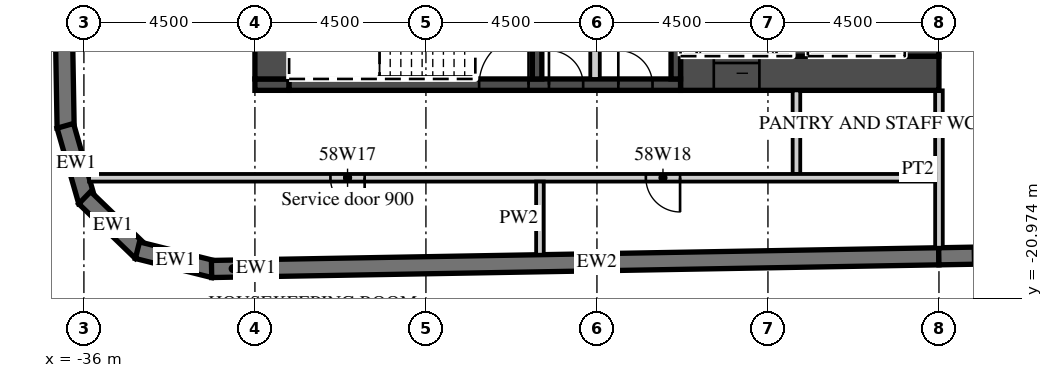
"""IFC4 building model, lengths in metres.
Left out: names, types, materials, properties, quantities, classifications, styles, units other than length and angle.
Written with IfcOpenShell. Run it as: python <this file> out.ifc"""

import sys

from ifc_helpers import new_model, si_unit, direction, frame, frame_2d, origin, place, context, subcontext, project, spatial, polyline, rectangle, outline, extrude, element, fill, save


model = new_model("IFC4")
c1 = context("Model", 3, precision=1e-05, world=origin(), true_north=direction((0.0, 1.0)))
c2 = subcontext(c1, "Body", "Model", "MODEL_VIEW")
j1 = project(units=[si_unit("LENGTHUNIT", "METRE"), si_unit("PLANEANGLEUNIT", "RADIAN")], contexts=[c1])
p1 = place(None, origin())
s1 = spatial("IfcSite", under=j1, at=p1, CompositionType="ELEMENT")
p2 = place(p1, origin())
s2 = spatial("IfcBuilding", under=s1, at=p2, CompositionType="ELEMENT")
p3 = place(p2, frame((0.0, 0.0, 237.5)))
s3 = spatial("IfcBuildingStorey", under=s2, at=p3, CompositionType="ELEMENT", Elevation=237.5)
p4 = place(p3, frame((-37.057, 16.503, 0.0), z_axis=(0.0, 0.0, 1.0), x_axis=(0.017452279857, -0.999847697366, 0.0)))
e1 = element("IfcWall", 1, at=p4, inside=s3, PredefinedType="SOLIDWALL", context=c2, shape_type="SweptSolid", body=[
    extrude(rectangle(XDim=33.0, YDim=0.45, at=frame_2d((16.5, 0.0))), origin(), (0.0, 0.0, 1.0), 3.02),
])
p5 = place(p3, frame((-36.49, -16.434, 0.0), z_axis=(0.0, 0.0, 1.0), x_axis=(0.275577603096, -0.961278827745, 0.0)))
e2 = element("IfcWall", 2, at=p5, inside=s3, PredefinedType="SOLIDWALL", context=c2, shape_type="SweptSolid", body=[
    extrude(outline(polyline([(0.0, -0.225), (2.071, -0.225), (1.95, 0.225), (0.121, 0.225), (0.0, -0.225)])), origin(), (0.0, 0.0, 1.0), 3.02),
])
p6 = place(p3, frame((-35.979, -18.324, 0.0), z_axis=(0.0, 0.0, 1.0), x_axis=(0.719320193998, -0.694678672846, 0.0)))
e3 = element("IfcWall", 3, at=p6, inside=s3, PredefinedType="SOLIDWALL", context=c2, shape_type="SweptSolid", body=[
    extrude(outline(polyline([(0.0, -0.225), (2.071, -0.225), (1.95, 0.225), (0.121, 0.225), (0.0, -0.225)])), origin(), (0.0, 0.0, 1.0), 3.02),
])
p7 = place(p3, frame((-34.591, -19.706, 0.0), z_axis=(0.0, 0.0, 1.0), x_axis=(0.970315655375, -0.241841950319, 0.0)))
e4 = element("IfcWall", 4, at=p7, inside=s3, PredefinedType="SOLIDWALL", context=c2, shape_type="SweptSolid", body=[
    extrude(outline(polyline([(0.0, -0.225), (2.071, -0.225), (1.95, 0.225), (0.121, 0.225), (0.0, -0.225)])), origin(), (0.0, 0.0, 1.0), 3.02),
])
p8 = place(p3, frame((-32.641, -20.2, 0.0), z_axis=(0.0, 0.0, 1.0), x_axis=(0.99984870815, 0.017394275206, 0.0)))
e5 = element("IfcWall", 5, at=p8, inside=s3, PredefinedType="SOLIDWALL", context=c2, shape_type="SweptSolid", body=[
    extrude(rectangle(XDim=1.137, YDim=0.45, at=frame_2d((0.568, 0.0))), origin(), (0.0, 0.0, 1.0), 3.02),
])
p9 = place(p3, frame((-31.504, -20.18, 0.0), z_axis=(0.0, 0.0, 1.0), x_axis=(0.999847677887, 0.017453395744, 0.0)))
e6 = element("IfcWall", 6, at=p9, inside=s3, PredefinedType="SOLIDWALL", context=c2, shape_type="SweptSolid", body=[
    extrude(rectangle(XDim=18.003, YDim=0.45, at=frame_2d((9.001, 0.0))), origin(), (0.0, 0.0, 1.0), 3.02),
])
p10 = place(p3, frame((-13.504, -19.866, 0.0), z_axis=(0.0, 0.0, 1.0), x_axis=(0.999847672978, 0.017453676992, 0.0)))
e7 = element("IfcWall", 7, at=p10, inside=s3, PredefinedType="SOLIDWALL", context=c2, shape_type="SweptSolid", body=[
    extrude(rectangle(XDim=52.86, YDim=0.45, at=frame_2d((26.43, 0.0))), origin(), (0.0, 0.0, 1.0), 3.02),
])
p11 = place(p10, frame((0.9, 0.0, 0.45)))
e8 = element("IfcOpeningElement", 8, at=p11, cuts=e7, PredefinedType="OPENING", context=c2, shape_type="SweptSolid", body=[
    extrude(rectangle(XDim=2.7, YDim=2.25, at=frame_2d((1.35, 1.125))), frame((0.0, 0.235, 0.0), z_axis=(0.0, -1.0, 0.0), x_axis=(1.0, 0.0, 0.0)), (0.0, 0.0, 1.0), 0.47),
])
p12 = place(p10, frame((5.401, 0.0, 0.45)))
e9 = element("IfcOpeningElement", 9, at=p12, cuts=e7, PredefinedType="OPENING", context=c2, shape_type="SweptSolid", body=[
    extrude(rectangle(XDim=2.7, YDim=2.25, at=frame_2d((1.35, 1.125))), frame((0.0, 0.235, 0.0), z_axis=(0.0, -1.0, 0.0), x_axis=(1.0, 0.0, 0.0)), (0.0, 0.0, 1.0), 0.47),
])
p13 = place(p10, frame((9.902, 0.0, 0.45)))
e10 = element("IfcOpeningElement", 10, at=p13, cuts=e7, PredefinedType="OPENING", context=c2, shape_type="SweptSolid", body=[
    extrude(rectangle(XDim=2.7, YDim=2.25, at=frame_2d((1.35, 1.125))), frame((0.0, 0.235, 0.0), z_axis=(0.0, -1.0, 0.0), x_axis=(1.0, 0.0, 0.0)), (0.0, 0.0, 1.0), 0.47),
])
p14 = place(p10, frame((14.402, 0.0, 0.45)))
e11 = element("IfcOpeningElement", 11, at=p14, cuts=e7, PredefinedType="OPENING", context=c2, shape_type="SweptSolid", body=[
    extrude(rectangle(XDim=2.7, YDim=2.25, at=frame_2d((1.35, 1.125))), frame((0.0, 0.235, 0.0), z_axis=(0.0, -1.0, 0.0), x_axis=(1.0, 0.0, 0.0)), (0.0, 0.0, 1.0), 0.47),
])
p15 = place(p10, frame((18.903, 0.0, 0.45)))
e12 = element("IfcOpeningElement", 12, at=p15, cuts=e7, PredefinedType="OPENING", context=c2, shape_type="SweptSolid", body=[
    extrude(rectangle(XDim=2.7, YDim=2.25, at=frame_2d((1.35, 1.125))), frame((0.0, 0.235, 0.0), z_axis=(0.0, -1.0, 0.0), x_axis=(1.0, 0.0, 0.0)), (0.0, 0.0, 1.0), 0.47),
])
p16 = place(p10, frame((23.404, 0.0, 0.45)))
e13 = element("IfcOpeningElement", 13, at=p16, cuts=e7, PredefinedType="OPENING", context=c2, shape_type="SweptSolid", body=[
    extrude(rectangle(XDim=2.7, YDim=2.25, at=frame_2d((1.35, 1.125))), frame((0.0, 0.235, 0.0), z_axis=(0.0, -1.0, 0.0), x_axis=(1.0, 0.0, 0.0)), (0.0, 0.0, 1.0), 0.47),
])
p17 = place(p10, frame((27.904, 0.0, 0.45)))
e14 = element("IfcOpeningElement", 14, at=p17, cuts=e7, PredefinedType="OPENING", context=c2, shape_type="SweptSolid", body=[
    extrude(rectangle(XDim=2.7, YDim=2.25, at=frame_2d((1.35, 1.125))), frame((0.0, 0.235, 0.0), z_axis=(0.0, -1.0, 0.0), x_axis=(1.0, 0.0, 0.0)), (0.0, 0.0, 1.0), 0.47),
])
p18 = place(p10, frame((32.405, 0.0, 0.45)))
e15 = element("IfcOpeningElement", 15, at=p18, cuts=e7, PredefinedType="OPENING", context=c2, shape_type="SweptSolid", body=[
    extrude(rectangle(XDim=2.7, YDim=2.25, at=frame_2d((1.35, 1.125))), frame((0.0, 0.235, 0.0), z_axis=(0.0, -1.0, 0.0), x_axis=(1.0, 0.0, 0.0)), (0.0, 0.0, 1.0), 0.47),
])
p19 = place(p10, frame((36.906, 0.0, 0.45)))
e16 = element("IfcOpeningElement", 16, at=p19, cuts=e7, PredefinedType="OPENING", context=c2, shape_type="SweptSolid", body=[
    extrude(rectangle(XDim=2.7, YDim=2.25, at=frame_2d((1.35, 1.125))), frame((0.0, 0.235, 0.0), z_axis=(0.0, -1.0, 0.0), x_axis=(1.0, 0.0, 0.0)), (0.0, 0.0, 1.0), 0.47),
])
p20 = place(p10, frame((41.406, 0.0, 0.45)))
e17 = element("IfcOpeningElement", 17, at=p20, cuts=e7, PredefinedType="OPENING", context=c2, shape_type="SweptSolid", body=[
    extrude(rectangle(XDim=2.7, YDim=2.25, at=frame_2d((1.35, 1.125))), frame((0.0, 0.235, 0.0), z_axis=(0.0, -1.0, 0.0), x_axis=(1.0, 0.0, 0.0)), (0.0, 0.0, 1.0), 0.47),
])
p21 = place(p10, frame((45.907, 0.0, 0.45)))
e18 = element("IfcOpeningElement", 18, at=p21, cuts=e7, PredefinedType="OPENING", context=c2, shape_type="SweptSolid", body=[
    extrude(rectangle(XDim=2.7, YDim=2.25, at=frame_2d((1.35, 1.125))), frame((0.0, 0.235, 0.0), z_axis=(0.0, -1.0, 0.0), x_axis=(1.0, 0.0, 0.0)), (0.0, 0.0, 1.0), 0.47),
])
p22 = place(p3, frame((-13.5, -19.641, 0.0), z_axis=(0.0, 0.0, 1.0), x_axis=(0.0, 1.0, 0.0)))
e19 = element("IfcWall", 19, at=p22, inside=s3, PredefinedType="PARTITIONING", context=c2, shape_type="SweptSolid", body=[
    extrude(rectangle(XDim=4.141, YDim=0.2, at=frame_2d((2.071, 0.0))), origin(), (0.0, 0.0, 1.0), 3.02),
])
p23 = place(p3, frame((-20.3, -15.05, 0.0), z_axis=(0.0, 0.0, 1.0), x_axis=(1.0, 0.0, 0.0)))
e20 = element("IfcWall", 20, at=p23, inside=s3, PredefinedType="SHEAR", context=c2, shape_type="SweptSolid", body=[
    extrude(rectangle(XDim=6.8, YDim=0.9, at=frame_2d((3.4, 0.0))), origin(), (0.0, 0.0, 1.0), 3.02),
])
p24 = place(p23, frame((0.875, 0.0, 0.0)))
e21 = element("IfcOpeningElement", 21, at=p24, cuts=e20, PredefinedType="OPENING", context=c2, shape_type="SweptSolid", body=[
    extrude(rectangle(XDim=1.2, YDim=2.1, at=frame_2d((0.6, 1.05))), frame((0.0, 0.46, 0.0), z_axis=(0.0, -1.0, 0.0), x_axis=(1.0, 0.0, 0.0)), (0.0, 0.0, 1.0), 0.92),
])
p25 = place(p3, frame((-31.5, -15.35, 0.0), z_axis=(0.0, 0.0, 1.0), x_axis=(1.0, 0.0, 0.0)))
e22 = element("IfcWall", 22, at=p25, inside=s3, PredefinedType="SHEAR", context=c2, shape_type="SweptSolid", body=[
    extrude(rectangle(XDim=0.9, YDim=0.3, at=frame_2d((0.45, 0.0))), origin(), (0.0, 0.0, 1.0), 3.02),
])
p26 = place(p3, frame((-30.6, -15.35, 0.0), z_axis=(0.0, 0.0, 1.0), x_axis=(1.0, 0.0, 0.0)))
e23 = element("IfcWall", 23, at=p26, inside=s3, PredefinedType="SHEAR", context=c2, shape_type="SweptSolid", body=[
    extrude(rectangle(XDim=10.3, YDim=0.3, at=frame_2d((5.15, 0.0))), origin(), (0.0, 0.0, 1.0), 3.02),
])
p27 = place(p26, frame((5.0, 0.0, 0.0)))
e24 = element("IfcOpeningElement", 24, at=p27, cuts=e23, PredefinedType="OPENING", context=c2, shape_type="SweptSolid", body=[
    extrude(rectangle(XDim=1.3, YDim=2.1, at=frame_2d((0.65, 1.05))), frame((0.0, 0.16, 0.0), z_axis=(0.0, -1.0, 0.0), x_axis=(1.0, 0.0, 0.0)), (0.0, 0.0, 1.0), 0.32),
])
p28 = place(p26, frame((6.837, 0.0, 0.0)))
e25 = element("IfcOpeningElement", 25, at=p28, cuts=e23, PredefinedType="OPENING", context=c2, shape_type="SweptSolid", body=[
    extrude(rectangle(XDim=0.9, YDim=2.1, at=frame_2d((0.45, 1.05))), frame((0.0, 0.16, 0.0), z_axis=(0.0, -1.0, 0.0), x_axis=(1.0, 0.0, 0.0)), (0.0, 0.0, 1.0), 0.32),
])
p29 = place(p26, frame((8.663, 0.0, 0.0)))
e26 = element("IfcOpeningElement", 26, at=p29, cuts=e23, PredefinedType="OPENING", context=c2, shape_type="SweptSolid", body=[
    extrude(rectangle(XDim=0.9, YDim=2.1, at=frame_2d((0.45, 1.05))), frame((0.0, 0.16, 0.0), z_axis=(0.0, -1.0, 0.0), x_axis=(1.0, 0.0, 0.0)), (0.0, 0.0, 1.0), 0.32),
])
p30 = place(p3, frame((-31.05, -15.2, 0.0), z_axis=(0.0, 0.0, 1.0), x_axis=(0.0, 1.0, 0.0)))
e27 = element("IfcWall", 27, at=p30, inside=s3, PredefinedType="SHEAR", context=c2, shape_type="SweptSolid", body=[
    extrude(rectangle(XDim=12.8, YDim=0.9, at=frame_2d((6.4, 0.0))), origin(), (0.0, 0.0, 1.0), 3.02),
])
p31 = place(p30, frame((11.5, 0.0, 0.0)))
e28 = element("IfcOpeningElement", 28, at=p31, cuts=e27, PredefinedType="OPENING", context=c2, shape_type="SweptSolid", body=[
    extrude(rectangle(XDim=1.1, YDim=2.1, at=frame_2d((0.55, 1.05))), frame((0.0, 0.46, 0.0), z_axis=(0.0, -1.0, 0.0), x_axis=(1.0, 0.0, 0.0)), (0.0, 0.0, 1.0), 0.92),
])
p32 = place(p3, frame((-13.95, -14.6, 0.0), z_axis=(0.0, 0.0, 1.0), x_axis=(0.0, 1.0, 0.0)))
e29 = element("IfcWall", 29, at=p32, inside=s3, PredefinedType="SHEAR", context=c2, shape_type="SweptSolid", body=[
    extrude(rectangle(XDim=12.2, YDim=0.9, at=frame_2d((6.1, 0.0))), origin(), (0.0, 0.0, 1.0), 3.02),
])
p33 = place(p3, frame((-17.15, -14.6, 0.0), z_axis=(0.0, 0.0, 1.0), x_axis=(0.0, 1.0, 0.0)))
e30 = element("IfcWall", 30, at=p33, inside=s3, PredefinedType="SHEAR", context=c2, shape_type="SweptSolid", body=[
    extrude(rectangle(XDim=5.8, YDim=0.4, at=frame_2d((2.9, 0.0))), origin(), (0.0, 0.0, 1.0), 3.02),
])
for number, where, z_axis, x_axis in (
    (31, (-20.425, -15.2, 0.0), (0.0, 0.0, 1.0), (0.0, 1.0, 0.0)),
    (32, (-24.075, -15.2, 0.0), (0.0, 0.0, 1.0), (0.0, 1.0, 0.0)),
):
    element("IfcWall", number, at=place(p3, frame(where, z_axis=z_axis, x_axis=x_axis)), inside=s3, PredefinedType="SHEAR", context=c2, shape_type="SweptSolid", body=[
        extrude(rectangle(XDim=3.25, YDim=0.25, at=frame_2d((1.625, 0.0))), origin(), (0.0, 0.0, 1.0), 3.02),
    ])
p34 = place(p3, frame((-22.55, -15.2, 0.0), z_axis=(0.0, 0.0, 1.0), x_axis=(0.0, 1.0, 0.0)))
e33 = element("IfcWall", 33, at=p34, inside=s3, PredefinedType="PARTITIONING", context=c2, shape_type="SweptSolid", body=[
    extrude(rectangle(XDim=3.25, YDim=0.25, at=frame_2d((1.625, 0.0))), origin(), (0.0, 0.0, 1.0), 3.02),
])
p35 = place(p3, frame((-17.25, -17.7, 0.0), z_axis=(0.0, 0.0, 1.0), x_axis=(0.0, 1.0, 0.0)))
e34 = element("IfcWall", 34, at=p35, inside=s3, PredefinedType="PARTITIONING", context=c2, shape_type="SweptSolid", body=[
    extrude(rectangle(XDim=2.2, YDim=0.2, at=frame_2d((1.1, 0.0))), origin(), (0.0, 0.0, 1.0), 3.02),
])
p36 = place(p3, frame((-35.864, -17.8, 0.0), z_axis=(0.0, 0.0, 1.0), x_axis=(1.0, 0.0, 0.0)))
e35 = element("IfcWall", 35, at=p36, inside=s3, PredefinedType="PARTITIONING", context=c2, shape_type="SweptSolid", body=[
    extrude(rectangle(XDim=22.264, YDim=0.2, at=frame_2d((11.132, 0.0))), origin(), (0.0, 0.0, 1.0), 3.02),
])
p37 = place(p36, frame((6.351, 0.0, 0.0)))
e36 = element("IfcOpeningElement", 36, at=p37, cuts=e35, PredefinedType="OPENING", context=c2, shape_type="SweptSolid", body=[
    extrude(rectangle(XDim=0.9, YDim=2.1, at=frame_2d((0.45, 1.05))), frame((0.0, 0.11, 0.0), z_axis=(0.0, -1.0, 0.0), x_axis=(1.0, 0.0, 0.0)), (0.0, 0.0, 1.0), 0.22),
])
p38 = place(p36, frame((14.651, 0.0, 0.0)))
e37 = element("IfcOpeningElement", 37, at=p38, cuts=e35, PredefinedType="OPENING", context=c2, shape_type="SweptSolid", body=[
    extrude(rectangle(XDim=0.9, YDim=2.1, at=frame_2d((0.45, 1.05))), frame((0.0, 0.11, 0.0), z_axis=(0.0, -1.0, 0.0), x_axis=(1.0, 0.0, 0.0)), (0.0, 0.0, 1.0), 0.22),
])
p39 = place(p3, frame((-24.0, -19.824, 0.0), z_axis=(0.0, 0.0, 1.0), x_axis=(0.0, 1.0, 0.0)))
e38 = element("IfcWall", 38, at=p39, inside=s3, PredefinedType="PARTITIONING", context=c2, shape_type="SweptSolid", body=[
    extrude(rectangle(XDim=1.925, YDim=0.2, at=frame_2d((0.962, 0.0))), origin(), (0.0, 0.0, 1.0), 3.02),
])
p40 = place(p11, origin())
e39 = element("IfcWindow", 39, at=p40, inside=s3, PartitioningType="SINGLE_PANEL", PredefinedType="WINDOW", context=c2, shape_type="SweptSolid", body=[
    extrude(rectangle(XDim=2.7, YDim=2.25, at=frame_2d((1.35, 1.125))), frame((0.0, 0.09, 0.0), z_axis=(0.0, -1.0, 0.0), x_axis=(1.0, 0.0, 0.0)), (0.0, 0.0, 1.0), 0.06),
])
fill(e8, e39)
p41 = place(p24, origin())
e40 = element("IfcDoor", 40, at=p41, inside=s3, OperationType="SLIDING_TO_LEFT", PredefinedType="DOOR", context=c2, shape_type="SweptSolid", body=[
    extrude(rectangle(XDim=1.2, YDim=2.1, at=frame_2d((0.6, 1.05))), frame((0.0, 0.025, 0.0), z_axis=(0.0, -1.0, 0.0), x_axis=(1.0, 0.0, 0.0)), (0.0, 0.0, 1.0), 0.05),
])
fill(e21, e40)
p42 = place(p27, origin())
e41 = element("IfcDoor", 41, at=p42, inside=s3, OperationType="SINGLE_SWING_RIGHT", PredefinedType="DOOR", context=c2, shape_type="SweptSolid", body=[
    extrude(rectangle(XDim=1.3, YDim=2.1, at=frame_2d((0.65, 1.05))), frame((0.0, 0.025, 0.0), z_axis=(0.0, -1.0, 0.0), x_axis=(1.0, 0.0, 0.0)), (0.0, 0.0, 1.0), 0.05),
])
fill(e24, e41)
p43 = place(p28, origin())
e42 = element("IfcDoor", 42, at=p43, inside=s3, OperationType="SINGLE_SWING_LEFT", PredefinedType="DOOR", context=c2, shape_type="SweptSolid", body=[
    extrude(rectangle(XDim=0.9, YDim=2.1, at=frame_2d((0.45, 1.05))), frame((0.0, 0.025, 0.0), z_axis=(0.0, -1.0, 0.0), x_axis=(1.0, 0.0, 0.0)), (0.0, 0.0, 1.0), 0.05),
])
fill(e25, e42)
p44 = place(p29, origin())
e43 = element("IfcDoor", 43, at=p44, inside=s3, OperationType="SINGLE_SWING_LEFT", PredefinedType="DOOR", context=c2, shape_type="SweptSolid", body=[
    extrude(rectangle(XDim=0.9, YDim=2.1, at=frame_2d((0.45, 1.05))), frame((0.0, 0.025, 0.0), z_axis=(0.0, -1.0, 0.0), x_axis=(1.0, 0.0, 0.0)), (0.0, 0.0, 1.0), 0.05),
])
fill(e26, e43)
p45 = place(p37, origin())
e44 = element("IfcDoor", 44, at=p45, inside=s3, OperationType="SINGLE_SWING_RIGHT", PredefinedType="DOOR", context=c2, shape_type="SweptSolid", body=[
    extrude(rectangle(XDim=0.9, YDim=2.1, at=frame_2d((0.45, 1.05))), frame((0.0, 0.025, 0.0), z_axis=(0.0, -1.0, 0.0), x_axis=(1.0, 0.0, 0.0)), (0.0, 0.0, 1.0), 0.05),
])
fill(e36, e44)
p46 = place(p38, origin())
e45 = element("IfcDoor", 45, at=p46, inside=s3, OperationType="SINGLE_SWING_RIGHT", PredefinedType="DOOR", context=c2, shape_type="SweptSolid", body=[
    extrude(rectangle(XDim=0.9, YDim=2.1, at=frame_2d((0.45, 1.05))), frame((0.0, 0.025, 0.0), z_axis=(0.0, -1.0, 0.0), x_axis=(1.0, 0.0, 0.0)), (0.0, 0.0, 1.0), 0.05),
])
fill(e37, e45)
save(model, sys.argv[1])
